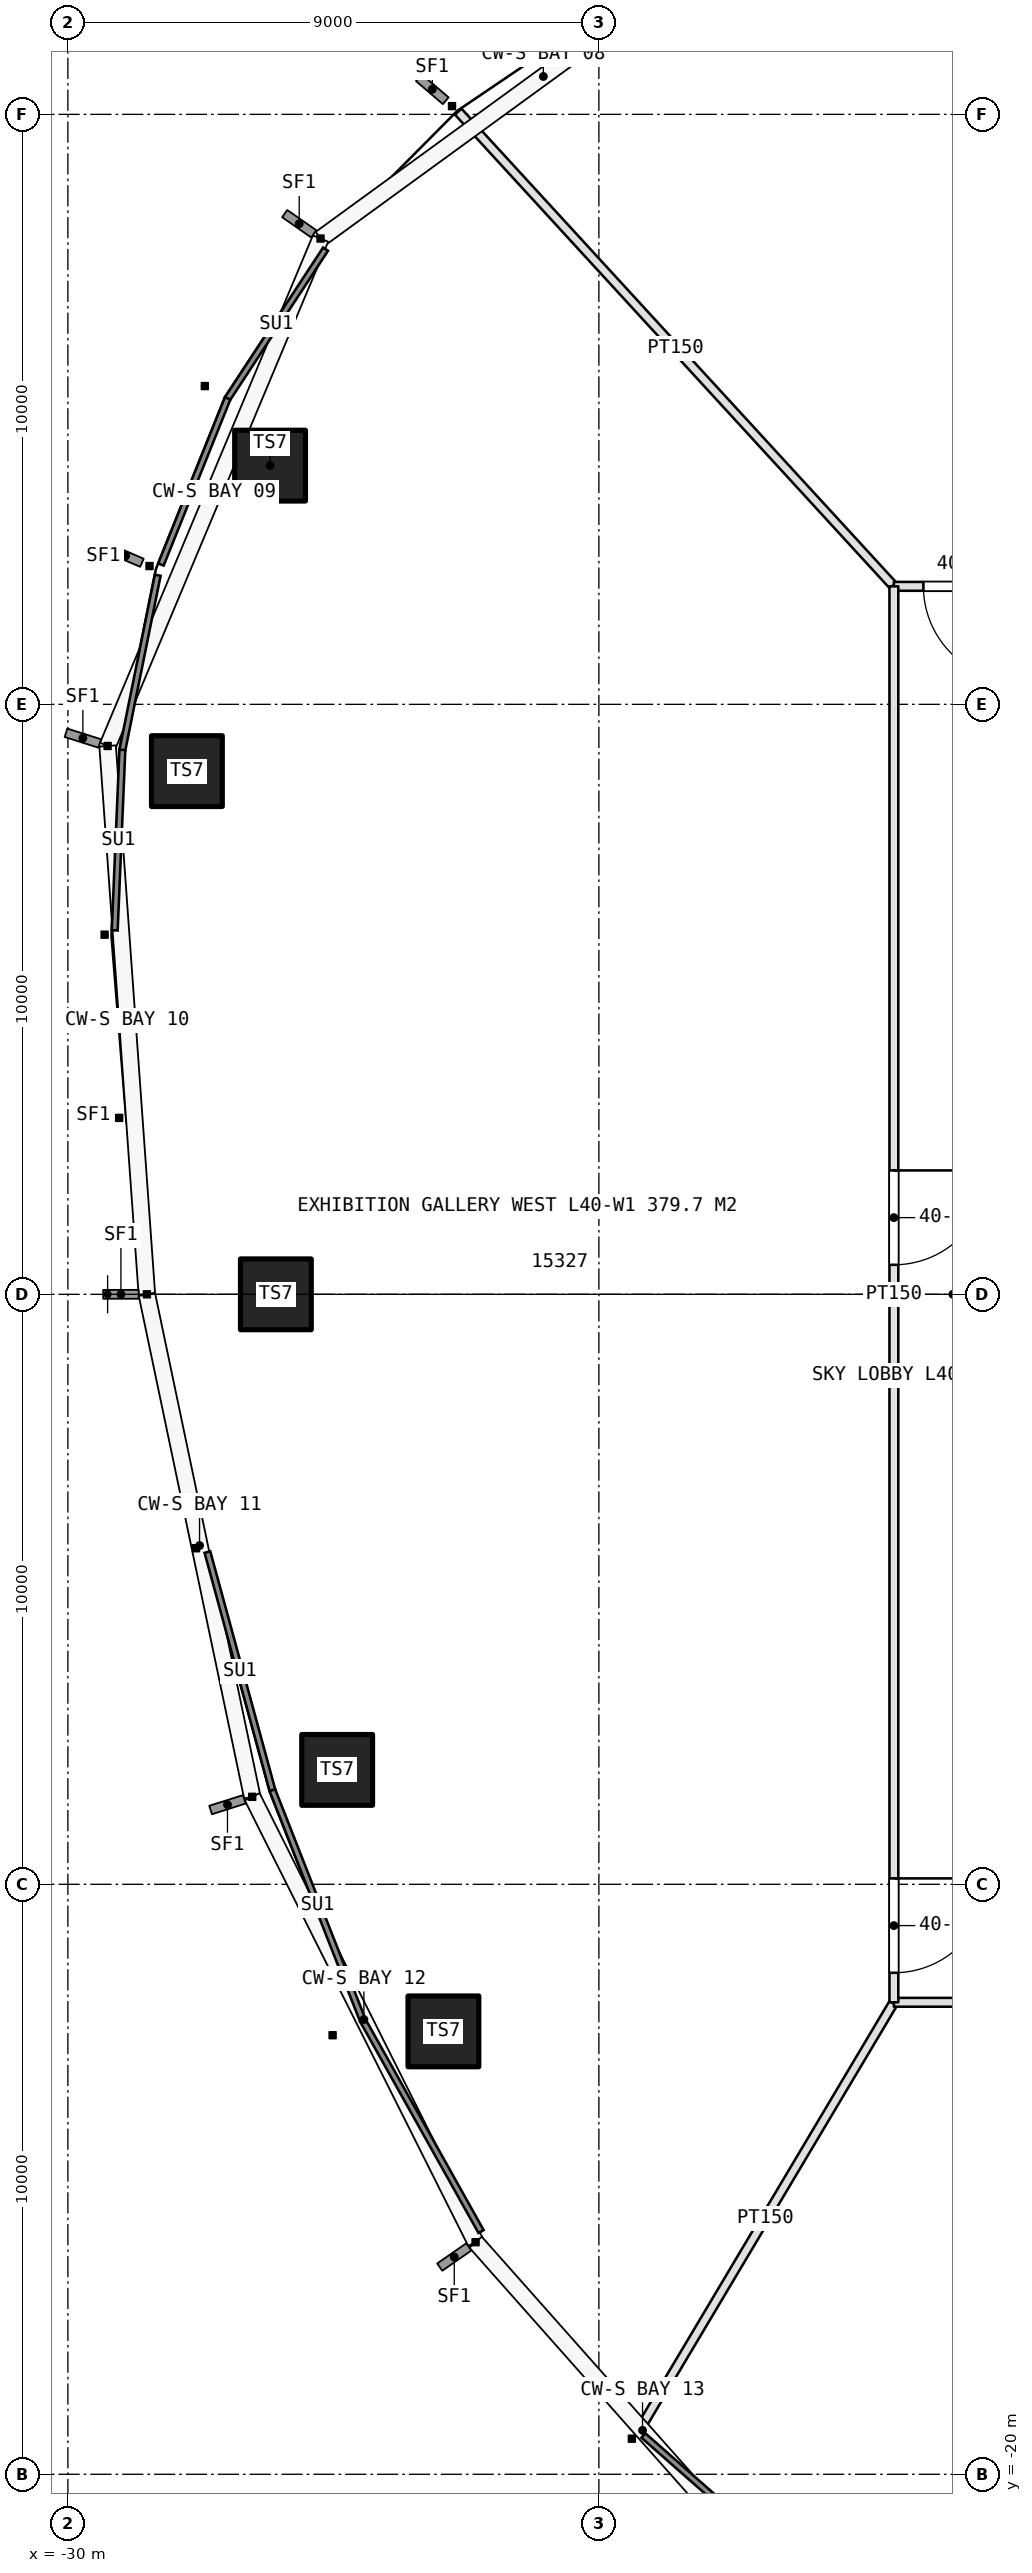
"""IFC4 building model, lengths in metres.
Left out: names, types, materials, properties, quantities, classifications, styles, units other than length and angle.
Written with IfcOpenShell. Run it as: python <this file> out.ifc"""

import sys

from ifc_helpers import new_model, si_unit, direction, frame, frame_2d, origin, origin_2d, place, context, subcontext, project, spatial, rectangle, hollow_rectangle, extrude, element, fill, save


model = new_model("IFC4")
c1 = context("Model", 3, precision=1e-05, world=origin(), true_north=direction((0.0, 1.0)))
c2 = subcontext(c1, "Body", "Model", "MODEL_VIEW")
j1 = project(units=[si_unit("LENGTHUNIT", "METRE"), si_unit("PLANEANGLEUNIT", "RADIAN")], contexts=[c1])
p1 = place(None, origin())
s1 = spatial("IfcSite", under=j1, at=p1, CompositionType="ELEMENT")
p2 = place(p1, origin())
s2 = spatial("IfcBuilding", under=s1, at=p2, CompositionType="ELEMENT")
p3 = place(p2, frame((0.0, 0.0, 184.8)))
s3 = spatial("IfcBuildingStorey", under=s2, at=p3, CompositionType="ELEMENT", Elevation=184.8)
for number, where, z_axis, x_axis in (
    (1, (-26.573, 14.046, 0.0), (0.0, 0.0, 1.0), (1.0, 0.0, 0.0)),
    (2, (-27.983, 8.868, 0.0), (0.0, 0.0, 1.0), (1.0, 0.0, 0.0)),
):
    element("IfcColumn", number, at=place(p3, frame(where, z_axis=z_axis, x_axis=x_axis)), inside=s3, PredefinedType="COLUMN", context=c2, shape_type="SweptSolid", body=[
        extrude(hollow_rectangle(XDim=1.2, YDim=1.2, WallThickness=0.12, at=origin_2d()), origin(), (0.0, 0.0, 1.0), 4.225),
    ])
p4 = place(p3, frame((-26.475, 0.0, 0.0), z_axis=(0.0, 0.0, 1.0), x_axis=(1.0, 0.0, 0.0)))
e3 = element("IfcColumn", 3, at=p4, inside=s3, PredefinedType="COLUMN", context=c2, shape_type="SweptSolid", body=[
    extrude(hollow_rectangle(XDim=1.2, YDim=1.2, WallThickness=0.12, at=origin_2d()), origin(), (0.0, 0.0, 1.0), 5.0),
])
for number, where, z_axis, x_axis in (
    (4, (-25.436, -8.061, 0.0), (0.0, 0.0, 1.0), (1.0, 0.0, 0.0)),
    (5, (-23.635, -12.493, 0.0), (0.0, 0.0, 1.0), (1.0, 0.0, 0.0)),
):
    element("IfcColumn", number, at=place(p3, frame(where, z_axis=z_axis, x_axis=x_axis)), inside=s3, PredefinedType="COLUMN", context=c2, shape_type="SweptSolid", body=[
        extrude(hollow_rectangle(XDim=1.2, YDim=1.2, WallThickness=0.12, at=origin_2d()), origin(), (0.0, 0.0, 1.0), 4.225),
    ])
p5 = place(p3, frame((-16.01, -12.017, 0.0), z_axis=(0.0, 0.0, 1.0), x_axis=(-0.511508688443, -0.85927810495, 0.0)))
e6 = element("IfcWall", 6, at=p5, inside=s3, PredefinedType="PARTITIONING", context=c2, shape_type="SweptSolid", body=[
    extrude(rectangle(XDim=8.47, YDim=0.15, at=frame_2d((4.235, 0.0))), origin(), (0.0, 0.0, 1.0), 3.6),
])
p6 = place(p3, frame((-16.013, 12.015, 0.0), z_axis=(0.0, 0.0, 1.0), x_axis=(-0.676167685567, 0.73674775941, 0.0)))
e7 = element("IfcWall", 7, at=p6, inside=s3, PredefinedType="PARTITIONING", context=c2, shape_type="SweptSolid", body=[
    extrude(rectangle(XDim=10.901, YDim=0.15, at=frame_2d((5.451, 0.0))), origin(), (0.0, 0.0, 1.0), 3.6),
])
p7 = place(p3, frame((-10.0, 12.0, 0.0), z_axis=(0.0, 0.0, 1.0), x_axis=(-1.0, 0.0, 0.0)))
e8 = element("IfcWall", 8, at=p7, inside=s3, PredefinedType="PARTITIONING", context=c2, shape_type="SweptSolid", body=[
    extrude(rectangle(XDim=6.0, YDim=0.15, at=frame_2d((3.0, 0.0))), origin(), (0.0, 0.0, 1.0), 3.6),
])
p8 = place(p7, frame((3.9, 0.0, 0.0)))
e9 = element("IfcOpeningElement", 9, at=p8, cuts=e8, PredefinedType="OPENING", context=c2, shape_type="SweptSolid", body=[
    extrude(rectangle(XDim=1.6, YDim=2.4, at=frame_2d((0.8, 1.2))), frame((0.0, 0.085, 0.0), z_axis=(0.0, -1.0, 0.0), x_axis=(1.0, 0.0, 0.0)), (0.0, 0.0, 1.0), 0.17),
])
p9 = place(p3, frame((-16.0, -12.0, 0.0), z_axis=(0.0, 0.0, 1.0), x_axis=(1.0, 0.0, 0.0)))
e10 = element("IfcWall", 10, at=p9, inside=s3, PredefinedType="PARTITIONING", context=c2, shape_type="SweptSolid", body=[
    extrude(rectangle(XDim=10.0, YDim=0.15, at=frame_2d((5.0, 0.0))), origin(), (0.0, 0.0, 1.0), 3.6),
])
p10 = place(p3, frame((-16.0, 12.0, 0.0), z_axis=(0.0, 0.0, 1.0), x_axis=(0.0, -1.0, 0.0)))
e11 = element("IfcWall", 11, at=p10, inside=s3, PredefinedType="PARTITIONING", context=c2, shape_type="SweptSolid", body=[
    extrude(rectangle(XDim=24.0, YDim=0.15, at=frame_2d((12.0, 0.0))), origin(), (0.0, 0.0, 1.0), 3.6),
])
p11 = place(p10, frame((9.9, 0.0, 0.0)))
e12 = element("IfcOpeningElement", 12, at=p11, cuts=e11, PredefinedType="OPENING", context=c2, shape_type="SweptSolid", body=[
    extrude(rectangle(XDim=1.6, YDim=2.4, at=frame_2d((0.8, 1.2))), frame((0.0, 0.085, 0.0), z_axis=(0.0, -1.0, 0.0), x_axis=(1.0, 0.0, 0.0)), (0.0, 0.0, 1.0), 0.17),
])
p12 = place(p10, frame((21.9, 0.0, 0.0)))
e13 = element("IfcOpeningElement", 13, at=p12, cuts=e11, PredefinedType="OPENING", context=c2, shape_type="SweptSolid", body=[
    extrude(rectangle(XDim=1.6, YDim=2.4, at=frame_2d((0.8, 1.2))), frame((0.0, 0.085, 0.0), z_axis=(0.0, -1.0, 0.0), x_axis=(1.0, 0.0, 0.0)), (0.0, 0.0, 1.0), 0.17),
])
p13 = place(p8, origin())
e14 = element("IfcDoor", 14, at=p13, inside=s3, OperationType="DOUBLE_DOOR_SINGLE_SWING", PredefinedType="DOOR", context=c2, shape_type="SweptSolid", body=[
    extrude(rectangle(XDim=1.6, YDim=2.4, at=frame_2d((0.8, 1.2))), frame((0.0, 0.025, 0.0), z_axis=(0.0, -1.0, 0.0), x_axis=(1.0, 0.0, 0.0)), (0.0, 0.0, 1.0), 0.05),
])
fill(e9, e14)
p14 = place(p11, origin())
e15 = element("IfcDoor", 15, at=p14, inside=s3, OperationType="DOUBLE_DOOR_SINGLE_SWING", PredefinedType="DOOR", context=c2, shape_type="SweptSolid", body=[
    extrude(rectangle(XDim=1.6, YDim=2.4, at=frame_2d((0.8, 1.2))), frame((0.0, 0.025, 0.0), z_axis=(0.0, -1.0, 0.0), x_axis=(1.0, 0.0, 0.0)), (0.0, 0.0, 1.0), 0.05),
])
fill(e12, e15)
p15 = place(p12, origin())
e16 = element("IfcDoor", 16, at=p15, inside=s3, OperationType="DOUBLE_DOOR_SINGLE_SWING", PredefinedType="DOOR", context=c2, shape_type="SweptSolid", body=[
    extrude(rectangle(XDim=1.6, YDim=2.4, at=frame_2d((0.8, 1.2))), frame((0.0, 0.025, 0.0), z_axis=(0.0, -1.0, 0.0), x_axis=(1.0, 0.0, 0.0)), (0.0, 0.0, 1.0), 0.05),
])
fill(e13, e16)
save(model, sys.argv[1])
